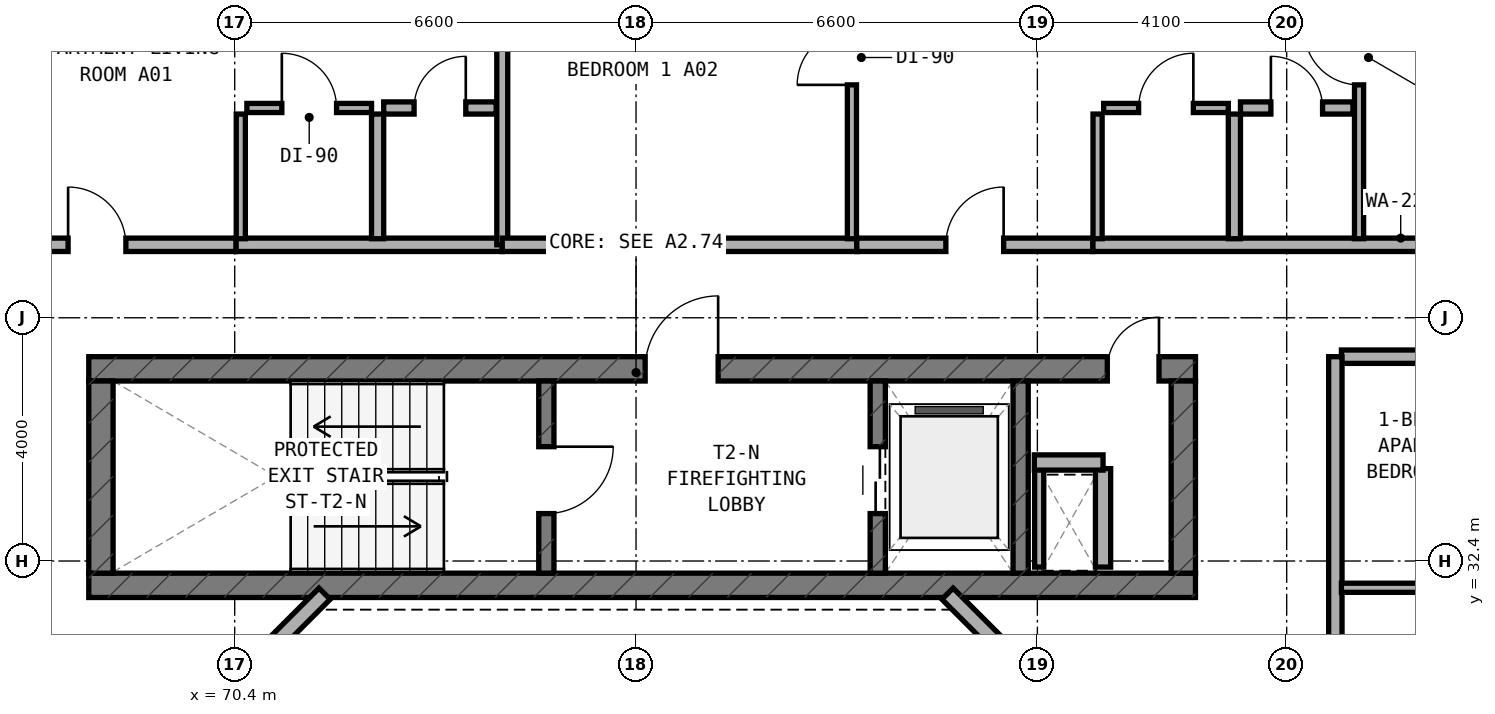
"""IFC4 building model, lengths in metres.
Left out: names, types, materials, properties, quantities, classifications, styles, units other than length and angle.
Written with IfcOpenShell. Run it as: python <this file> out.ifc"""

import sys

from ifc_helpers import new_model, si_unit, direction, frame, frame_2d, origin, place, context, subcontext, project, spatial, rectangle, extrude, element, fill, save


model = new_model("IFC4")
c1 = context("Model", 3, precision=1e-05, world=origin(), true_north=direction((0.0, 1.0)))
c2 = subcontext(c1, "Body", "Model", "MODEL_VIEW")
j1 = project(units=[si_unit("LENGTHUNIT", "METRE"), si_unit("PLANEANGLEUNIT", "RADIAN")], contexts=[c1])
p1 = place(None, origin())
s1 = spatial("IfcSite", under=j1, at=p1, CompositionType="ELEMENT")
p2 = place(p1, origin())
s2 = spatial("IfcBuilding", under=s1, at=p2, CompositionType="ELEMENT")
p3 = place(p2, frame((0.0, 0.0, 124.0)))
s3 = spatial("IfcBuildingStorey", under=s2, at=p3, CompositionType="ELEMENT", Elevation=124.0)
p4 = place(p3, frame((68.0, 32.0, 0.0), z_axis=(0.0, 0.0, 1.0), x_axis=(1.0, 0.0, 0.0)))
e1 = element("IfcWall", 1, at=p4, inside=s3, PredefinedType="SHEAR", context=c2, shape_type="SweptSolid", body=[
    extrude(rectangle(XDim=18.2, YDim=0.4, at=frame_2d((9.1, 0.0))), origin(), (0.0, 0.0, 1.0), 3.5),
])
p5 = place(p3, frame((68.0, 35.56, 0.0), z_axis=(0.0, 0.0, 1.0), x_axis=(1.0, 0.0, 0.0)))
e2 = element("IfcWall", 2, at=p5, inside=s3, PredefinedType="SHEAR", context=c2, shape_type="SweptSolid", body=[
    extrude(rectangle(XDim=18.2, YDim=0.4, at=frame_2d((9.1, 0.0))), origin(), (0.0, 0.0, 1.0), 3.5),
])
p6 = place(p5, frame((9.15, 0.0, 0.0)))
e3 = element("IfcOpeningElement", 3, at=p6, cuts=e2, PredefinedType="OPENING", context=c2, shape_type="SweptSolid", body=[
    extrude(rectangle(XDim=1.2, YDim=2.15, at=frame_2d((0.6, 1.075))), frame((0.0, 0.21, 0.0), z_axis=(0.0, -1.0, 0.0), x_axis=(1.0, 0.0, 0.0)), (0.0, 0.0, 1.0), 0.42),
])
p7 = place(p5, frame((16.75, 0.0, 0.0)))
e4 = element("IfcOpeningElement", 4, at=p7, cuts=e2, PredefinedType="OPENING", context=c2, shape_type="SweptSolid", body=[
    extrude(rectangle(XDim=0.85, YDim=2.1, at=frame_2d((0.425, 1.05))), frame((0.0, 0.21, 0.0), z_axis=(0.0, -1.0, 0.0), x_axis=(1.0, 0.0, 0.0)), (0.0, 0.0, 1.0), 0.42),
])
for number, where, z_axis, x_axis in (
    (5, (68.2, 32.2, 0.0), (0.0, 0.0, 1.0), (0.0, 1.0, 0.0)),
    (6, (86.0, 32.2, 0.0), (0.0, 0.0, 1.0), (0.0, 1.0, 0.0)),
):
    element("IfcWall", number, at=place(p3, frame(where, z_axis=z_axis, x_axis=x_axis)), inside=s3, PredefinedType="SHEAR", context=c2, shape_type="SweptSolid", body=[
        extrude(rectangle(XDim=3.16, YDim=0.4, at=frame_2d((1.58, 0.0))), origin(), (0.0, 0.0, 1.0), 3.5),
    ])
p8 = place(p3, frame((75.525, 32.2, 0.0), z_axis=(0.0, 0.0, 1.0), x_axis=(0.0, 1.0, 0.0)))
e7 = element("IfcWall", 7, at=p8, inside=s3, PredefinedType="STANDARD", context=c2, shape_type="SweptSolid", body=[
    extrude(rectangle(XDim=3.16, YDim=0.25, at=frame_2d((1.58, 0.0))), origin(), (0.0, 0.0, 1.0), 3.25),
])
p9 = place(p8, frame((0.98, 0.0, 0.0)))
e8 = element("IfcOpeningElement", 8, at=p9, cuts=e7, PredefinedType="OPENING", context=c2, shape_type="SweptSolid", body=[
    extrude(rectangle(XDim=1.1, YDim=2.15, at=frame_2d((0.55, 1.075))), frame((0.0, 0.135, 0.0), z_axis=(0.0, -1.0, 0.0), x_axis=(1.0, 0.0, 0.0)), (0.0, 0.0, 1.0), 0.27),
])
p10 = place(p3, frame((80.975, 32.2, 0.0), z_axis=(0.0, 0.0, 1.0), x_axis=(0.0, 1.0, 0.0)))
e9 = element("IfcWall", 9, at=p10, inside=s3, PredefinedType="STANDARD", context=c2, shape_type="SweptSolid", body=[
    extrude(rectangle(XDim=3.16, YDim=0.25, at=frame_2d((1.58, 0.0))), origin(), (0.0, 0.0, 1.0), 3.25),
])
p11 = place(p10, frame((0.98, 0.0, 0.0)))
e10 = element("IfcOpeningElement", 10, at=p11, cuts=e9, PredefinedType="OPENING", context=c2, shape_type="SweptSolid", body=[
    extrude(rectangle(XDim=1.1, YDim=2.15, at=frame_2d((0.55, 1.075))), frame((0.0, 0.135, 0.0), z_axis=(0.0, -1.0, 0.0), x_axis=(1.0, 0.0, 0.0)), (0.0, 0.0, 1.0), 0.27),
])
p12 = place(p3, frame((83.325, 32.2, 0.0), z_axis=(0.0, 0.0, 1.0), x_axis=(0.0, 1.0, 0.0)))
e11 = element("IfcWall", 11, at=p12, inside=s3, PredefinedType="STANDARD", context=c2, shape_type="SweptSolid", body=[
    extrude(rectangle(XDim=3.16, YDim=0.25, at=frame_2d((1.58, 0.0))), origin(), (0.0, 0.0, 1.0), 3.25),
])
for number, where, z_axis, x_axis in (
    (12, (83.756, 30.228, 0.0), (0.0, 0.0, 1.0), (-0.707, 0.707, 0.0)),
    (13, (71.878, 31.862, 0.0), (0.0, 0.0, 1.0), (-0.707, -0.707, 0.0)),
):
    element("IfcWall", number, at=place(p3, frame(where, z_axis=z_axis, x_axis=x_axis)), inside=s3, PredefinedType="STANDARD", context=c2, shape_type="SweptSolid", body=[
        extrude(rectangle(XDim=2.311, YDim=0.26, at=frame_2d((1.155, 0.0))), origin(), (0.0, 0.0, 1.0), 3.25),
    ])
p13 = place(p3, frame((83.63, 32.3, 0.0), z_axis=(0.0, 0.0, 1.0), x_axis=(0.0, 1.0, 0.0)))
e14 = element("IfcWall", 14, at=p13, inside=s3, PredefinedType="PARTITIONING", context=c2, shape_type="SweptSolid", body=[
    extrude(rectangle(XDim=1.62, YDim=0.15, at=frame_2d((0.81, 0.0))), origin(), (0.0, 0.0, 1.0), 2.825),
])
p14 = place(p3, frame((84.68, 32.3, 0.0), z_axis=(0.0, 0.0, 1.0), x_axis=(0.0, 1.0, 0.0)))
e15 = element("IfcWall", 15, at=p14, inside=s3, PredefinedType="SOLIDWALL", context=c2, shape_type="SweptSolid", body=[
    extrude(rectangle(XDim=1.62, YDim=0.25, at=frame_2d((0.81, 0.0))), origin(), (0.0, 0.0, 1.0), 3.22),
])
p15 = place(p3, frame((83.55, 34.02, 0.0), z_axis=(0.0, 0.0, 1.0), x_axis=(1.0, 0.0, 0.0)))
e16 = element("IfcWall", 16, at=p15, inside=s3, PredefinedType="SOLIDWALL", context=c2, shape_type="SweptSolid", body=[
    extrude(rectangle(XDim=1.13, YDim=0.25, at=frame_2d((0.565, 0.0))), origin(), (0.0, 0.0, 1.0), 3.22),
])
p16 = place(p3, frame((70.42, 37.6, 0.0), z_axis=(0.0, 0.0, 1.0), x_axis=(1.0, 0.0, 0.0)))
e17 = element("IfcWall", 17, at=p16, inside=s3, PredefinedType="SOLIDWALL", context=c2, shape_type="SweptSolid", body=[
    extrude(rectangle(XDim=4.38, YDim=0.22, at=frame_2d((2.19, 0.0))), origin(), (0.0, 0.0, 1.0), 2.825),
])
p17 = place(p3, frame((65.85, 37.6, 0.0), z_axis=(0.0, 0.0, 1.0), x_axis=(1.0, 0.0, 0.0)))
e18 = element("IfcWall", 18, at=p17, inside=s3, PredefinedType="SOLIDWALL", context=c2, shape_type="SweptSolid", body=[
    extrude(rectangle(XDim=4.57, YDim=0.22, at=frame_2d((2.285, 0.0))), origin(), (0.0, 0.0, 1.0), 3.22),
])
p18 = place(p17, frame((1.81, 0.0, 0.0)))
e19 = element("IfcOpeningElement", 19, at=p18, cuts=e18, PredefinedType="OPENING", context=c2, shape_type="SweptSolid", body=[
    extrude(rectangle(XDim=0.95, YDim=2.1, at=frame_2d((0.475, 1.05))), frame((0.0, 0.12, 0.0), z_axis=(0.0, -1.0, 0.0), x_axis=(1.0, 0.0, 0.0)), (0.0, 0.0, 1.0), 0.24),
])
p19 = place(p3, frame((72.75, 37.7, 0.0), z_axis=(0.0, 0.0, 1.0), x_axis=(0.0, 1.0, 0.0)))
e20 = element("IfcWall", 20, at=p19, inside=s3, PredefinedType="PLUMBINGWALL", context=c2, shape_type="SweptSolid", body=[
    extrude(rectangle(XDim=2.05, YDim=0.2, at=frame_2d((1.025, 0.0))), origin(), (0.0, 0.0, 1.0), 2.825),
])
p20 = place(p3, frame((70.5, 37.7, 0.0), z_axis=(0.0, 0.0, 1.0), x_axis=(0.0, 1.0, 0.0)))
e21 = element("IfcWall", 21, at=p20, inside=s3, PredefinedType="PARTITIONING", context=c2, shape_type="SweptSolid", body=[
    extrude(rectangle(XDim=2.05, YDim=0.15, at=frame_2d((1.025, 0.0))), origin(), (0.0, 0.0, 1.0), 3.22),
])
p21 = place(p3, frame((72.85, 39.85, 0.0), z_axis=(0.0, 0.0, 1.0), x_axis=(1.0, 0.0, 0.0)))
e22 = element("IfcWall", 22, at=p21, inside=s3, PredefinedType="PLUMBINGWALL", context=c2, shape_type="SweptSolid", body=[
    extrude(rectangle(XDim=1.85, YDim=0.2, at=frame_2d((0.925, 0.0))), origin(), (0.0, 0.0, 1.0), 3.22),
])
p22 = place(p21, frame((0.5, 0.0, 0.0)))
e23 = element("IfcOpeningElement", 23, at=p22, cuts=e22, PredefinedType="OPENING", context=c2, shape_type="SweptSolid", body=[
    extrude(rectangle(XDim=0.85, YDim=2.1, at=frame_2d((0.425, 1.05))), frame((0.0, 0.11, 0.0), z_axis=(0.0, -1.0, 0.0), x_axis=(1.0, 0.0, 0.0)), (0.0, 0.0, 1.0), 0.22),
])
p23 = place(p3, frame((70.6, 39.85, 0.0), z_axis=(0.0, 0.0, 1.0), x_axis=(1.0, 0.0, 0.0)))
e24 = element("IfcWall", 24, at=p23, inside=s3, PredefinedType="PARTITIONING", context=c2, shape_type="SweptSolid", body=[
    extrude(rectangle(XDim=2.05, YDim=0.15, at=frame_2d((1.025, 0.0))), origin(), (0.0, 0.0, 1.0), 2.825),
])
p24 = place(p23, frame((0.575, 0.0, 0.0)))
e25 = element("IfcOpeningElement", 25, at=p24, cuts=e24, PredefinedType="OPENING", context=c2, shape_type="SweptSolid", body=[
    extrude(rectangle(XDim=0.9, YDim=2.1, at=frame_2d((0.45, 1.05))), frame((0.0, 0.085, 0.0), z_axis=(0.0, -1.0, 0.0), x_axis=(1.0, 0.0, 0.0)), (0.0, 0.0, 1.0), 0.17),
])
p25 = place(p3, frame((74.8, 37.6, 0.0), z_axis=(0.0, 0.0, 1.0), x_axis=(0.0, 1.0, 0.0)))
e26 = element("IfcWall", 26, at=p25, inside=s3, PredefinedType="SOLIDWALL", context=c2, shape_type="SweptSolid", body=[
    extrude(rectangle(XDim=5.74, YDim=0.18, at=frame_2d((2.87, 0.0))), origin(), (0.0, 0.0, 1.0), 2.945),
])
p26 = place(p3, frame((74.8, 37.6, 0.0), z_axis=(0.0, 0.0, 1.0), x_axis=(1.0, 0.0, 0.0)))
e27 = element("IfcWall", 27, at=p26, inside=s3, PredefinedType="SOLIDWALL", context=c2, shape_type="SweptSolid", body=[
    extrude(rectangle(XDim=5.83, YDim=0.22, at=frame_2d((2.915, 0.0))), origin(), (0.0, 0.0, 1.0), 3.22),
])
p27 = place(p3, frame((84.51, 37.6, 0.0), z_axis=(0.0, 0.0, 1.0), x_axis=(1.0, 0.0, 0.0)))
e28 = element("IfcWall", 28, at=p27, inside=s3, PredefinedType="SOLIDWALL", context=c2, shape_type="SweptSolid", body=[
    extrude(rectangle(XDim=10.13, YDim=0.22, at=frame_2d((5.065, 0.0))), origin(), (0.0, 0.0, 1.0), 2.945),
])
p28 = place(p3, frame((80.63, 37.6, 0.0), z_axis=(0.0, 0.0, 1.0), x_axis=(1.0, 0.0, 0.0)))
e29 = element("IfcWall", 29, at=p28, inside=s3, PredefinedType="SOLIDWALL", context=c2, shape_type="SweptSolid", body=[
    extrude(rectangle(XDim=3.88, YDim=0.22, at=frame_2d((1.94, 0.0))), origin(), (0.0, 0.0, 1.0), 2.825),
])
p29 = place(p28, frame((1.465, 0.0, 0.0)))
e30 = element("IfcOpeningElement", 30, at=p29, cuts=e29, PredefinedType="OPENING", context=c2, shape_type="SweptSolid", body=[
    extrude(rectangle(XDim=0.95, YDim=2.1, at=frame_2d((0.475, 1.05))), frame((0.0, 0.12, 0.0), z_axis=(0.0, -1.0, 0.0), x_axis=(1.0, 0.0, 0.0)), (0.0, 0.0, 1.0), 0.24),
])
p30 = place(p3, frame((80.55, 37.7, 0.0), z_axis=(0.0, 0.0, 1.0), x_axis=(0.0, 1.0, 0.0)))
e31 = element("IfcWall", 31, at=p30, inside=s3, PredefinedType="PARTITIONING", context=c2, shape_type="SweptSolid", body=[
    extrude(rectangle(XDim=5.54, YDim=0.15, at=frame_2d((2.77, 0.0))), origin(), (0.0, 0.0, 1.0), 2.945),
])
p31 = place(p30, frame((2.53, 0.0, 0.0)))
e32 = element("IfcOpeningElement", 32, at=p31, cuts=e31, PredefinedType="OPENING", context=c2, shape_type="SweptSolid", body=[
    extrude(rectangle(XDim=0.9, YDim=2.1, at=frame_2d((0.45, 1.05))), frame((0.0, 0.085, 0.0), z_axis=(0.0, -1.0, 0.0), x_axis=(1.0, 0.0, 0.0)), (0.0, 0.0, 1.0), 0.17),
])
p32 = place(p3, frame((88.89, 37.7, 0.0), z_axis=(0.0, 0.0, 1.0), x_axis=(0.0, 1.0, 0.0)))
e33 = element("IfcWall", 33, at=p32, inside=s3, PredefinedType="PARTITIONING", context=c2, shape_type="SweptSolid", body=[
    extrude(rectangle(XDim=4.27, YDim=0.15, at=frame_2d((2.135, 0.0))), origin(), (0.0, 0.0, 1.0), 2.945),
])
p33 = place(p32, frame((2.53, 0.0, 0.0)))
e34 = element("IfcOpeningElement", 34, at=p33, cuts=e33, PredefinedType="OPENING", context=c2, shape_type="SweptSolid", body=[
    extrude(rectangle(XDim=0.9, YDim=2.1, at=frame_2d((0.45, 1.05))), frame((0.0, 0.085, 0.0), z_axis=(0.0, -1.0, 0.0), x_axis=(1.0, 0.0, 0.0)), (0.0, 0.0, 1.0), 0.17),
])
p34 = place(p3, frame((86.84, 37.7, 0.0), z_axis=(0.0, 0.0, 1.0), x_axis=(0.0, 1.0, 0.0)))
e35 = element("IfcWall", 35, at=p34, inside=s3, PredefinedType="PLUMBINGWALL", context=c2, shape_type="SweptSolid", body=[
    extrude(rectangle(XDim=2.05, YDim=0.2, at=frame_2d((1.025, 0.0))), origin(), (0.0, 0.0, 1.0), 3.22),
])
p35 = place(p3, frame((84.59, 37.7, 0.0), z_axis=(0.0, 0.0, 1.0), x_axis=(0.0, 1.0, 0.0)))
e36 = element("IfcWall", 36, at=p35, inside=s3, PredefinedType="PARTITIONING", context=c2, shape_type="SweptSolid", body=[
    extrude(rectangle(XDim=2.05, YDim=0.15, at=frame_2d((1.025, 0.0))), origin(), (0.0, 0.0, 1.0), 3.22),
])
p36 = place(p3, frame((86.94, 39.85, 0.0), z_axis=(0.0, 0.0, 1.0), x_axis=(1.0, 0.0, 0.0)))
e37 = element("IfcWall", 37, at=p36, inside=s3, PredefinedType="PLUMBINGWALL", context=c2, shape_type="SweptSolid", body=[
    extrude(rectangle(XDim=1.85, YDim=0.2, at=frame_2d((0.925, 0.0))), origin(), (0.0, 0.0, 1.0), 3.22),
])
p37 = place(p36, frame((0.5, 0.0, 0.0)))
e38 = element("IfcOpeningElement", 38, at=p37, cuts=e37, PredefinedType="OPENING", context=c2, shape_type="SweptSolid", body=[
    extrude(rectangle(XDim=0.85, YDim=2.1, at=frame_2d((0.425, 1.05))), frame((0.0, 0.11, 0.0), z_axis=(0.0, -1.0, 0.0), x_axis=(1.0, 0.0, 0.0)), (0.0, 0.0, 1.0), 0.22),
])
p38 = place(p3, frame((84.69, 39.85, 0.0), z_axis=(0.0, 0.0, 1.0), x_axis=(1.0, 0.0, 0.0)))
e39 = element("IfcWall", 39, at=p38, inside=s3, PredefinedType="PARTITIONING", context=c2, shape_type="SweptSolid", body=[
    extrude(rectangle(XDim=2.05, YDim=0.15, at=frame_2d((1.025, 0.0))), origin(), (0.0, 0.0, 1.0), 3.22),
])
p39 = place(p38, frame((0.575, 0.0, 0.0)))
e40 = element("IfcOpeningElement", 40, at=p39, cuts=e39, PredefinedType="OPENING", context=c2, shape_type="SweptSolid", body=[
    extrude(rectangle(XDim=0.9, YDim=2.1, at=frame_2d((0.45, 1.05))), frame((0.0, 0.085, 0.0), z_axis=(0.0, -1.0, 0.0), x_axis=(1.0, 0.0, 0.0)), (0.0, 0.0, 1.0), 0.17),
])
p40 = place(p3, frame((88.6, 35.76, 0.0), z_axis=(0.0, 0.0, 1.0), x_axis=(1.0, 0.0, 0.0)))
e41 = element("IfcWall", 41, at=p40, inside=s3, PredefinedType="SOLIDWALL", context=c2, shape_type="SweptSolid", body=[
    extrude(rectangle(XDim=5.88, YDim=0.22, at=frame_2d((2.94, 0.0))), origin(), (0.0, 0.0, 1.0), 2.945),
])
p41 = place(p3, frame((88.5, 26.4, 0.0), z_axis=(0.0, 0.0, 1.0), x_axis=(0.0, 1.0, 0.0)))
e42 = element("IfcWall", 42, at=p41, inside=s3, PredefinedType="SOLIDWALL", context=c2, shape_type="SweptSolid", body=[
    extrude(rectangle(XDim=9.36, YDim=0.22, at=frame_2d((4.68, 0.0))), origin(), (0.0, 0.0, 1.0), 2.825),
])
p42 = place(p41, frame((2.305, 0.0, 0.0)))
e43 = element("IfcOpeningElement", 43, at=p42, cuts=e42, PredefinedType="OPENING", context=c2, shape_type="SweptSolid", body=[
    extrude(rectangle(XDim=0.95, YDim=2.1, at=frame_2d((0.475, 1.05))), frame((0.0, 0.12, 0.0), z_axis=(0.0, -1.0, 0.0), x_axis=(1.0, 0.0, 0.0)), (0.0, 0.0, 1.0), 0.24),
])
p43 = place(p3, frame((88.6, 31.96, 0.0), z_axis=(0.0, 0.0, 1.0), x_axis=(1.0, 0.0, 0.0)))
e44 = element("IfcWall", 44, at=p43, inside=s3, PredefinedType="PARTITIONING", context=c2, shape_type="SweptSolid", body=[
    extrude(rectangle(XDim=5.94, YDim=0.15, at=frame_2d((2.97, 0.0))), origin(), (0.0, 0.0, 1.0), 2.945),
])
p44 = place(p43, frame((2.45, 0.0, 0.0)))
e45 = element("IfcOpeningElement", 45, at=p44, cuts=e44, PredefinedType="OPENING", context=c2, shape_type="SweptSolid", body=[
    extrude(rectangle(XDim=0.9, YDim=2.1, at=frame_2d((0.45, 1.05))), frame((0.0, 0.085, 0.0), z_axis=(0.0, -1.0, 0.0), x_axis=(1.0, 0.0, 0.0)), (0.0, 0.0, 1.0), 0.17),
])
p45 = place(p9, frame((1.1, 0.0, 0.0), z_axis=(0.0, 0.0, 1.0), x_axis=(-1.0, 0.0, 0.0)))
e46 = element("IfcDoor", 46, at=p45, inside=s3, OperationType="SINGLE_SWING_LEFT", PredefinedType="DOOR", context=c2, shape_type="SweptSolid", body=[
    extrude(rectangle(XDim=1.1, YDim=2.15, at=frame_2d((0.55, 1.075))), frame((0.0, 0.025, 0.0), z_axis=(0.0, -1.0, 0.0), x_axis=(1.0, 0.0, 0.0)), (0.0, 0.0, 1.0), 0.05),
])
fill(e8, e46)
p46 = place(p6, origin())
e47 = element("IfcDoor", 47, at=p46, inside=s3, OperationType="SINGLE_SWING_RIGHT", PredefinedType="DOOR", context=c2, shape_type="SweptSolid", body=[
    extrude(rectangle(XDim=1.2, YDim=2.15, at=frame_2d((0.6, 1.075))), frame((0.0, 0.025, 0.0), z_axis=(0.0, -1.0, 0.0), x_axis=(1.0, 0.0, 0.0)), (0.0, 0.0, 1.0), 0.05),
])
fill(e3, e47)
p47 = place(p11, origin())
e48 = element("IfcDoor", 48, at=p47, inside=s3, OperationType="DOUBLE_DOOR_SLIDING", PredefinedType="DOOR", context=c2, shape_type="SweptSolid", body=[
    extrude(rectangle(XDim=1.1, YDim=2.15, at=frame_2d((0.55, 1.075))), frame((0.0, 0.025, 0.0), z_axis=(0.0, -1.0, 0.0), x_axis=(1.0, 0.0, 0.0)), (0.0, 0.0, 1.0), 0.05),
])
fill(e10, e48)
p48 = place(p7, origin())
e49 = element("IfcDoor", 49, at=p48, inside=s3, OperationType="SINGLE_SWING_RIGHT", PredefinedType="DOOR", context=c2, shape_type="SweptSolid", body=[
    extrude(rectangle(XDim=0.85, YDim=2.1, at=frame_2d((0.425, 1.05))), frame((0.0, 0.025, 0.0), z_axis=(0.0, -1.0, 0.0), x_axis=(1.0, 0.0, 0.0)), (0.0, 0.0, 1.0), 0.05),
])
fill(e4, e49)
p49 = place(p18, origin())
e50 = element("IfcDoor", 50, at=p49, inside=s3, OperationType="SINGLE_SWING_LEFT", PredefinedType="DOOR", context=c2, shape_type="SweptSolid", body=[
    extrude(rectangle(XDim=0.95, YDim=2.1, at=frame_2d((0.475, 1.05))), frame((0.0, 0.025, 0.0), z_axis=(0.0, -1.0, 0.0), x_axis=(1.0, 0.0, 0.0)), (0.0, 0.0, 1.0), 0.05),
])
fill(e19, e50)
p50 = place(p22, origin())
e51 = element("IfcDoor", 51, at=p50, inside=s3, OperationType="SINGLE_SWING_RIGHT", PredefinedType="DOOR", context=c2, shape_type="SweptSolid", body=[
    extrude(rectangle(XDim=0.85, YDim=2.1, at=frame_2d((0.425, 1.05))), frame((0.0, 0.025, 0.0), z_axis=(0.0, -1.0, 0.0), x_axis=(1.0, 0.0, 0.0)), (0.0, 0.0, 1.0), 0.05),
])
fill(e23, e51)
p51 = place(p24, origin())
e52 = element("IfcDoor", 52, at=p51, inside=s3, OperationType="SINGLE_SWING_LEFT", PredefinedType="DOOR", context=c2, shape_type="SweptSolid", body=[
    extrude(rectangle(XDim=0.9, YDim=2.1, at=frame_2d((0.45, 1.05))), frame((0.0, 0.025, 0.0), z_axis=(0.0, -1.0, 0.0), x_axis=(1.0, 0.0, 0.0)), (0.0, 0.0, 1.0), 0.05),
])
fill(e25, e52)
p52 = place(p29, origin())
e53 = element("IfcDoor", 53, at=p52, inside=s3, OperationType="SINGLE_SWING_RIGHT", PredefinedType="DOOR", context=c2, shape_type="SweptSolid", body=[
    extrude(rectangle(XDim=0.95, YDim=2.1, at=frame_2d((0.475, 1.05))), frame((0.0, 0.025, 0.0), z_axis=(0.0, -1.0, 0.0), x_axis=(1.0, 0.0, 0.0)), (0.0, 0.0, 1.0), 0.05),
])
fill(e30, e53)
p53 = place(p31, origin())
e54 = element("IfcDoor", 54, at=p53, inside=s3, OperationType="SINGLE_SWING_LEFT", PredefinedType="DOOR", context=c2, shape_type="SweptSolid", body=[
    extrude(rectangle(XDim=0.9, YDim=2.1, at=frame_2d((0.45, 1.05))), frame((0.0, 0.025, 0.0), z_axis=(0.0, -1.0, 0.0), x_axis=(1.0, 0.0, 0.0)), (0.0, 0.0, 1.0), 0.05),
])
fill(e32, e54)
p54 = place(p33, origin())
e55 = element("IfcDoor", 55, at=p54, inside=s3, OperationType="SINGLE_SWING_RIGHT", PredefinedType="DOOR", context=c2, shape_type="SweptSolid", body=[
    extrude(rectangle(XDim=0.9, YDim=2.1, at=frame_2d((0.45, 1.05))), frame((0.0, 0.025, 0.0), z_axis=(0.0, -1.0, 0.0), x_axis=(1.0, 0.0, 0.0)), (0.0, 0.0, 1.0), 0.05),
])
fill(e34, e55)
p55 = place(p37, origin())
e56 = element("IfcDoor", 56, at=p55, inside=s3, OperationType="SINGLE_SWING_LEFT", PredefinedType="DOOR", context=c2, shape_type="SweptSolid", body=[
    extrude(rectangle(XDim=0.85, YDim=2.1, at=frame_2d((0.425, 1.05))), frame((0.0, 0.025, 0.0), z_axis=(0.0, -1.0, 0.0), x_axis=(1.0, 0.0, 0.0)), (0.0, 0.0, 1.0), 0.05),
])
fill(e38, e56)
p56 = place(p39, origin())
e57 = element("IfcDoor", 57, at=p56, inside=s3, OperationType="SINGLE_SWING_RIGHT", PredefinedType="DOOR", context=c2, shape_type="SweptSolid", body=[
    extrude(rectangle(XDim=0.9, YDim=2.1, at=frame_2d((0.45, 1.05))), frame((0.0, 0.025, 0.0), z_axis=(0.0, -1.0, 0.0), x_axis=(1.0, 0.0, 0.0)), (0.0, 0.0, 1.0), 0.05),
])
fill(e40, e57)
save(model, sys.argv[1])
